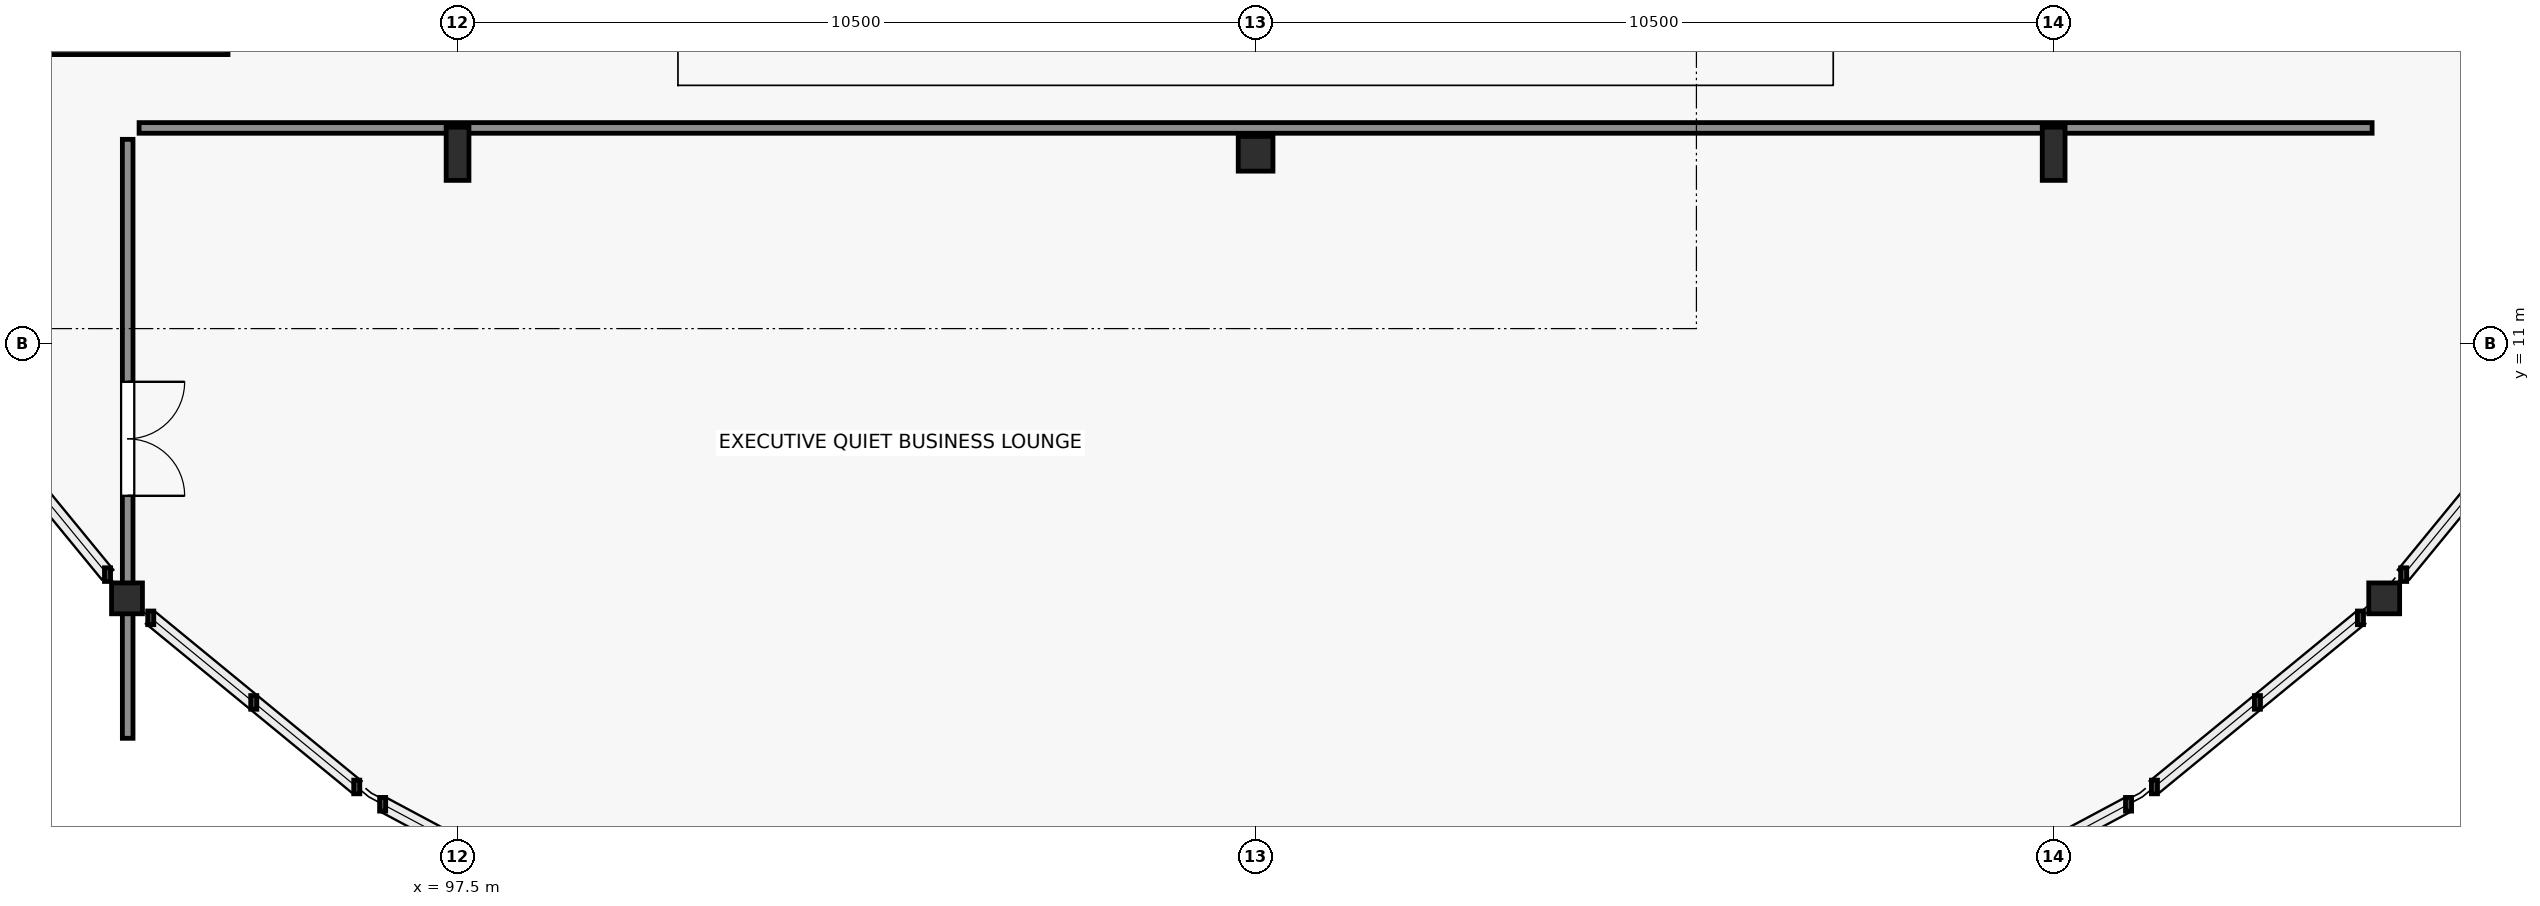
"""IFC4 building model, lengths in metres.
Left out: names, types, materials, properties, quantities, classifications, styles, units other than length and angle.
Written with IfcOpenShell. Run it as: python <this file> out.ifc"""

import sys

from ifc_helpers import new_model, si_unit, direction, frame, frame_2d, origin, origin_2d, place, context, subcontext, project, spatial, rectangle, hollow_circle, i_section, extrude, element, fill, save


model = new_model("IFC4")
c1 = context("Model", 3, precision=1e-05, world=origin(), true_north=direction((0.0, 1.0)))
c2 = subcontext(c1, "Body", "Model", "MODEL_VIEW")
j1 = project(units=[si_unit("LENGTHUNIT", "METRE"), si_unit("PLANEANGLEUNIT", "RADIAN")], contexts=[c1])
p1 = place(None, origin())
s1 = spatial("IfcSite", under=j1, at=p1, CompositionType="ELEMENT")
p2 = place(p1, origin())
s2 = spatial("IfcBuilding", under=s1, at=p2, CompositionType="ELEMENT")
p3 = place(p2, frame((0.0, 0.0, 15.0)))
s3 = spatial("IfcBuildingStorey", under=s2, at=p3, CompositionType="ELEMENT", Elevation=15.0)
for number, where, z_axis, x_axis in (
    (1, (93.151, 7.651, 0.0), (0.0, 0.0, 1.0), (1.0, 0.0, 0.0)),
    (2, (122.849, 7.651, 0.0), (0.0, 0.0, 1.0), (1.0, 0.0, 0.0)),
):
    element("IfcColumn", number, at=place(p3, frame(where, z_axis=z_axis, x_axis=x_axis)), inside=s3, PredefinedType="COLUMN", context=c2, shape_type="SweptSolid", body=[
        extrude(hollow_circle(Radius=0.203, WallThickness=0.02, at=origin_2d()), origin(), (0.0, 0.0, 1.0), 4.31),
    ])
p4 = place(p3, frame((97.5, 13.5, 0.0), z_axis=(0.0, 0.0, 1.0), x_axis=(1.0, 0.0, 0.0)))
e3 = element("IfcColumn", 3, at=p4, inside=s3, PredefinedType="COLUMN", context=c2, shape_type="SweptSolid", body=[
    extrude(i_section(OverallWidth=0.3, OverallDepth=0.7, WebThickness=0.017, FlangeThickness=0.032, FilletRadius=0.027, at=origin_2d()), origin(), (0.0, 0.0, 1.0), 4.325),
])
p5 = place(p3, frame((108.0, 13.5, 0.0), z_axis=(0.0, 0.0, 1.0), x_axis=(1.0, 0.0, 0.0)))
e4 = element("IfcColumn", 4, at=p5, inside=s3, PredefinedType="COLUMN", context=c2, shape_type="SweptSolid", body=[
    extrude(hollow_circle(Radius=0.229, WallThickness=0.02, at=origin_2d()), origin(), (0.0, 0.0, 1.0), 4.325),
])
p6 = place(p3, frame((118.5, 13.5, 0.0), z_axis=(0.0, 0.0, 1.0), x_axis=(1.0, 0.0, 0.0)))
e5 = element("IfcColumn", 5, at=p6, inside=s3, PredefinedType="COLUMN", context=c2, shape_type="SweptSolid", body=[
    extrude(i_section(OverallWidth=0.3, OverallDepth=0.7, WebThickness=0.017, FlangeThickness=0.032, FilletRadius=0.027, at=origin_2d()), origin(), (0.0, 0.0, 1.0), 4.325),
])
p7 = place(p3, frame((93.16, 13.69, 0.0), z_axis=(0.0, 0.0, 1.0), x_axis=(0.0, -1.0, 0.0)))
e6 = element("IfcWall", 6, at=p7, inside=s3, PredefinedType="PARTITIONING", context=c2, shape_type="SweptSolid", body=[
    extrude(rectangle(XDim=7.88, YDim=0.14, at=frame_2d((3.94, 0.0))), origin(), (0.0, 0.0, 1.0), 3.845),
])
p8 = place(p7, frame((3.19, 0.0, 0.0)))
e7 = element("IfcOpeningElement", 7, at=p8, cuts=e6, PredefinedType="OPENING", context=c2, shape_type="SweptSolid", body=[
    extrude(rectangle(XDim=1.5, YDim=2.2, at=frame_2d((0.75, 1.1))), frame((0.0, 0.08, 0.0), z_axis=(0.0, -1.0, 0.0), x_axis=(1.0, 0.0, 0.0)), (0.0, 0.0, 1.0), 0.16),
])
p9 = place(p3, frame((93.31, 13.84, 0.0), z_axis=(0.0, 0.0, 1.0), x_axis=(1.0, 0.0, 0.0)))
e8 = element("IfcWall", 8, at=p9, inside=s3, PredefinedType="PARTITIONING", context=c2, shape_type="SweptSolid", body=[
    extrude(rectangle(XDim=29.38, YDim=0.14, at=frame_2d((14.69, 0.0))), origin(), (0.0, 0.0, 1.0), 3.905),
])
p10 = place(p3, frame((94.48, 14.92, 0.0), z_axis=(0.0, 0.0, 1.0), x_axis=(-1.0, 0.0, 0.0)))
e9 = element("IfcWall", 9, at=p10, inside=s3, PredefinedType="SOLIDWALL", context=c2, shape_type="SweptSolid", body=[
    extrude(rectangle(XDim=2.96, YDim=0.23, at=frame_2d((1.48, 0.0))), origin(), (0.0, 0.0, 1.0), 4.26),
])
p11 = place(p8, origin())
e10 = element("IfcDoor", 10, at=p11, inside=s3, OperationType="DOUBLE_DOOR_SINGLE_SWING", PredefinedType="DOOR", context=c2, shape_type="SweptSolid", body=[
    extrude(rectangle(XDim=1.5, YDim=2.2, at=frame_2d((0.75, 1.1))), frame((0.0, 0.025, 0.0), z_axis=(0.0, -1.0, 0.0), x_axis=(1.0, 0.0, 0.0)), (0.0, 0.0, 1.0), 0.05),
])
fill(e7, e10)
save(model, sys.argv[1])
